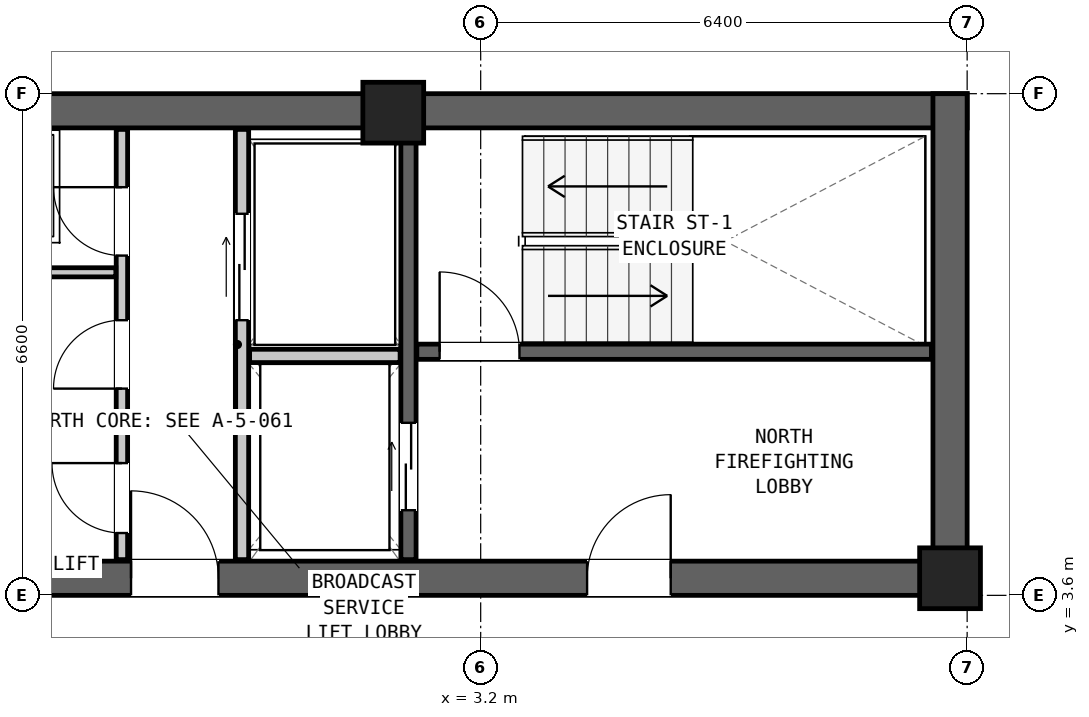
"""IFC4 building model, lengths in metres.
Left out: names, types, materials, properties, quantities, classifications, styles, units other than length and angle.
Written with IfcOpenShell. Run it as: python <this file> out.ifc"""

import sys

from ifc_helpers import new_model, si_unit, direction, frame, frame_2d, origin, origin_2d, place, context, subcontext, project, spatial, rectangle, extrude, element, fill, save


model = new_model("IFC4")
c1 = context("Model", 3, precision=1e-05, world=origin(), true_north=direction((0.0, 1.0)))
c2 = subcontext(c1, "Body", "Model", "MODEL_VIEW")
j1 = project(units=[si_unit("LENGTHUNIT", "METRE"), si_unit("PLANEANGLEUNIT", "RADIAN")], contexts=[c1])
p1 = place(None, origin())
s1 = spatial("IfcSite", under=j1, at=p1, CompositionType="ELEMENT")
p2 = place(p1, origin())
s2 = spatial("IfcBuilding", under=s1, at=p2, CompositionType="ELEMENT")
p3 = place(p2, frame((0.0, 0.0, 199.5)))
s3 = spatial("IfcBuildingStorey", under=s2, at=p3, CompositionType="ELEMENT", Elevation=199.5)
p4 = place(p3, frame((-9.6, 9.975, 0.0), z_axis=(0.0, 0.0, 1.0), x_axis=(1.0, 0.0, 0.0)))
e1 = element("IfcWall", 1, at=p4, inside=s3, PredefinedType="SHEAR", context=c2, shape_type="SweptSolid", body=[
    extrude(rectangle(XDim=19.2, YDim=0.45, at=frame_2d((9.6, 0.0))), origin(), (0.0, 0.0, 1.0), 3.05),
])
p5 = place(p3, frame((-9.6, 3.825, 0.0), z_axis=(0.0, 0.0, 1.0), x_axis=(1.0, 0.0, 0.0)))
e2 = element("IfcWall", 2, at=p5, inside=s3, PredefinedType="SHEAR", context=c2, shape_type="SweptSolid", body=[
    extrude(rectangle(XDim=19.2, YDim=0.45, at=frame_2d((9.6, 0.0))), origin(), (0.0, 0.0, 1.0), 3.05),
])
p6 = place(p5, frame((14.2, 0.0, 0.0)))
e3 = element("IfcOpeningElement", 3, at=p6, cuts=e2, PredefinedType="OPENING", context=c2, shape_type="SweptSolid", body=[
    extrude(rectangle(XDim=1.1, YDim=2.08, at=frame_2d((0.55, 1.04))), frame((0.0, 0.237, 0.0), z_axis=(0.0, -1.0, 0.0), x_axis=(1.0, 0.0, 0.0)), (0.0, 0.0, 1.0), 0.474),
])
p7 = place(p5, frame((8.2, 0.0, 0.0)))
e4 = element("IfcOpeningElement", 4, at=p7, cuts=e2, PredefinedType="OPENING", context=c2, shape_type="SweptSolid", body=[
    extrude(rectangle(XDim=1.15, YDim=2.1, at=frame_2d((0.575, 1.05))), frame((0.0, 0.237, 0.0), z_axis=(0.0, -1.0, 0.0), x_axis=(1.0, 0.0, 0.0)), (0.0, 0.0, 1.0), 0.474),
])
p8 = place(p5, frame((2.5, 0.0, 0.0)))
e5 = element("IfcOpeningElement", 5, at=p8, cuts=e2, PredefinedType="OPENING", context=c2, shape_type="SweptSolid", body=[
    extrude(rectangle(XDim=1.6, YDim=2.12, at=frame_2d((0.8, 1.06))), frame((0.0, 0.237, 0.0), z_axis=(0.0, -1.0, 0.0), x_axis=(1.0, 0.0, 0.0)), (0.0, 0.0, 1.0), 0.474),
])
p9 = place(p3, frame((9.375, 3.6, 0.0), z_axis=(0.0, 0.0, 1.0), x_axis=(0.0, 1.0, 0.0)))
e6 = element("IfcWall", 6, at=p9, inside=s3, PredefinedType="SHEAR", context=c2, shape_type="SweptSolid", body=[
    extrude(rectangle(XDim=6.6, YDim=0.45, at=frame_2d((3.3, 0.0))), origin(), (0.0, 0.0, 1.0), 3.05),
])
for number, where, z_axis, x_axis in (
    (7, (2.05, 9.95, 0.0), (0.0, 0.0, 1.0), (1.0, 0.0, 0.0)),
    (8, (9.375, 3.825, 0.0), (0.0, 0.0, 1.0), (1.0, 0.0, 0.0)),
):
    element("IfcColumn", number, at=place(p3, frame(where, z_axis=z_axis, x_axis=x_axis)), inside=s3, PredefinedType="COLUMN", context=c2, shape_type="SweptSolid", body=[
        extrude(rectangle(XDim=0.8, YDim=0.8, at=origin_2d()), origin(), (0.0, 0.0, 1.0), 3.05),
    ])
p10 = place(p3, frame((2.36, 6.805, 0.0), z_axis=(0.0, 0.0, 1.0), x_axis=(1.0, 0.0, 0.0)))
e9 = element("IfcWall", 9, at=p10, inside=s3, PredefinedType="SHEAR", context=c2, shape_type="SweptSolid", body=[
    extrude(rectangle(XDim=6.77, YDim=0.2, at=frame_2d((3.385, 0.0))), origin(), (0.0, 0.0, 1.0), 2.86),
])
p11 = place(p10, frame((0.3, 0.0, 0.0)))
e10 = element("IfcOpeningElement", 10, at=p11, cuts=e9, PredefinedType="OPENING", context=c2, shape_type="SweptSolid", body=[
    extrude(rectangle(XDim=1.05, YDim=2.08, at=frame_2d((0.525, 1.04))), frame((0.0, 0.112, 0.0), z_axis=(0.0, -1.0, 0.0), x_axis=(1.0, 0.0, 0.0)), (0.0, 0.0, 1.0), 0.224),
])
p12 = place(p3, frame((2.25, 4.07, 0.0), z_axis=(0.0, 0.0, 1.0), x_axis=(0.0, 1.0, 0.0)))
e11 = element("IfcWall", 11, at=p12, inside=s3, PredefinedType="SHEAR", context=c2, shape_type="SweptSolid", body=[
    extrude(rectangle(XDim=5.66, YDim=0.2, at=frame_2d((2.83, 0.0))), origin(), (0.0, 0.0, 1.0), 2.86),
])
p13 = place(p12, frame((0.65, 0.0, 0.0)))
e12 = element("IfcOpeningElement", 12, at=p13, cuts=e11, PredefinedType="OPENING", context=c2, shape_type="SweptSolid", body=[
    extrude(rectangle(XDim=1.15, YDim=2.08, at=frame_2d((0.575, 1.04))), frame((0.0, 0.112, 0.0), z_axis=(0.0, -1.0, 0.0), x_axis=(1.0, 0.0, 0.0)), (0.0, 0.0, 1.0), 0.224),
])
p14 = place(p3, frame((0.06, 4.07, 0.0), z_axis=(0.0, 0.0, 1.0), x_axis=(0.0, 1.0, 0.0)))
e13 = element("IfcWall", 13, at=p14, inside=s3, PredefinedType="PARTITIONING", context=c2, shape_type="SweptSolid", body=[
    extrude(rectangle(XDim=5.66, YDim=0.175, at=frame_2d((2.83, 0.0))), origin(), (0.0, 0.0, 1.0), 2.86),
])
p15 = place(p14, frame((3.15, 0.0, 0.0)))
e14 = element("IfcOpeningElement", 14, at=p15, cuts=e13, PredefinedType="OPENING", context=c2, shape_type="SweptSolid", body=[
    extrude(rectangle(XDim=1.4, YDim=2.12, at=frame_2d((0.7, 1.06))), frame((0.0, 0.1, 0.0), z_axis=(0.0, -1.0, 0.0), x_axis=(1.0, 0.0, 0.0)), (0.0, 0.0, 1.0), 0.199),
])
p16 = place(p3, frame((0.16, 6.75, 0.0), z_axis=(0.0, 0.0, 1.0), x_axis=(1.0, 0.0, 0.0)))
e15 = element("IfcWall", 15, at=p16, inside=s3, PredefinedType="PARTITIONING", context=c2, shape_type="SweptSolid", body=[
    extrude(rectangle(XDim=1.98, YDim=0.175, at=frame_2d((0.99, 0.0))), origin(), (0.0, 0.0, 1.0), 2.86),
])
p17 = place(p3, frame((-1.52, 4.07, 0.0), z_axis=(0.0, 0.0, 1.0), x_axis=(0.0, 1.0, 0.0)))
e16 = element("IfcWall", 16, at=p17, inside=s3, PredefinedType="PARTITIONING", context=c2, shape_type="SweptSolid", body=[
    extrude(rectangle(XDim=5.66, YDim=0.15, at=frame_2d((2.83, 0.0))), origin(), (0.0, 0.0, 1.0), 2.86),
])
p18 = place(p17, frame((4.0, 0.0, 0.0)))
e17 = element("IfcOpeningElement", 17, at=p18, cuts=e16, PredefinedType="OPENING", context=c2, shape_type="SweptSolid", body=[
    extrude(rectangle(XDim=0.9, YDim=2.05, at=frame_2d((0.45, 1.025))), frame((0.0, 0.087, 0.0), z_axis=(0.0, -1.0, 0.0), x_axis=(1.0, 0.0, 0.0)), (0.0, 0.0, 1.0), 0.174),
])
p19 = place(p17, frame((2.25, 0.0, 0.0)))
e18 = element("IfcOpeningElement", 18, at=p19, cuts=e16, PredefinedType="OPENING", context=c2, shape_type="SweptSolid", body=[
    extrude(rectangle(XDim=0.9, YDim=2.05, at=frame_2d((0.45, 1.025))), frame((0.0, 0.087, 0.0), z_axis=(0.0, -1.0, 0.0), x_axis=(1.0, 0.0, 0.0)), (0.0, 0.0, 1.0), 0.174),
])
p20 = place(p17, frame((0.35, 0.0, 0.0)))
e19 = element("IfcOpeningElement", 19, at=p20, cuts=e16, PredefinedType="OPENING", context=c2, shape_type="SweptSolid", body=[
    extrude(rectangle(XDim=0.92, YDim=2.1, at=frame_2d((0.46, 1.05))), frame((0.0, 0.087, 0.0), z_axis=(0.0, -1.0, 0.0), x_axis=(1.0, 0.0, 0.0)), (0.0, 0.0, 1.0), 0.174),
])
for number, where, z_axis, x_axis in (
    (20, (-2.96, 5.95, 0.0), (0.0, 0.0, 1.0), (1.0, 0.0, 0.0)),
    (21, (-2.96, 7.85, 0.0), (0.0, 0.0, 1.0), (1.0, 0.0, 0.0)),
):
    element("IfcWall", number, at=place(p3, frame(where, z_axis=z_axis, x_axis=x_axis)), inside=s3, PredefinedType="PARTITIONING", context=c2, shape_type="SweptSolid", body=[
        extrude(rectangle(XDim=1.36, YDim=0.12, at=frame_2d((0.68, 0.0))), origin(), (0.0, 0.0, 1.0), 2.86),
    ])
p21 = place(p11, origin())
e22 = element("IfcDoor", 22, at=p21, inside=s3, OperationType="SINGLE_SWING_LEFT", PredefinedType="DOOR", context=c2, shape_type="SweptSolid", body=[
    extrude(rectangle(XDim=1.05, YDim=2.08, at=frame_2d((0.525, 1.04))), frame((0.0, 0.025, 0.0), z_axis=(0.0, -1.0, 0.0), x_axis=(1.0, 0.0, 0.0)), (0.0, 0.0, 1.0), 0.05),
])
fill(e10, e22)
p22 = place(p6, origin())
e23 = element("IfcDoor", 23, at=p22, inside=s3, OperationType="SINGLE_SWING_RIGHT", PredefinedType="DOOR", context=c2, shape_type="SweptSolid", body=[
    extrude(rectangle(XDim=1.1, YDim=2.08, at=frame_2d((0.55, 1.04))), frame((0.0, 0.025, 0.0), z_axis=(0.0, -1.0, 0.0), x_axis=(1.0, 0.0, 0.0)), (0.0, 0.0, 1.0), 0.05),
])
fill(e3, e23)
p23 = place(p13, origin())
e24 = element("IfcDoor", 24, at=p23, inside=s3, OperationType="DOUBLE_DOOR_SLIDING", PredefinedType="DOOR", context=c2, shape_type="SweptSolid", body=[
    extrude(rectangle(XDim=1.15, YDim=2.08, at=frame_2d((0.575, 1.04))), frame((0.0, 0.025, 0.0), z_axis=(0.0, -1.0, 0.0), x_axis=(1.0, 0.0, 0.0)), (0.0, 0.0, 1.0), 0.05),
])
fill(e12, e24)
p24 = place(p15, origin())
e25 = element("IfcDoor", 25, at=p24, inside=s3, OperationType="DOUBLE_DOOR_SLIDING", PredefinedType="DOOR", context=c2, shape_type="SweptSolid", body=[
    extrude(rectangle(XDim=1.4, YDim=2.12, at=frame_2d((0.7, 1.06))), frame((0.0, 0.025, 0.0), z_axis=(0.0, -1.0, 0.0), x_axis=(1.0, 0.0, 0.0)), (0.0, 0.0, 1.0), 0.05),
])
fill(e14, e25)
p25 = place(p7, origin())
e26 = element("IfcDoor", 26, at=p25, inside=s3, OperationType="SINGLE_SWING_LEFT", PredefinedType="DOOR", context=c2, shape_type="SweptSolid", body=[
    extrude(rectangle(XDim=1.15, YDim=2.1, at=frame_2d((0.575, 1.05))), frame((0.0, 0.025, 0.0), z_axis=(0.0, -1.0, 0.0), x_axis=(1.0, 0.0, 0.0)), (0.0, 0.0, 1.0), 0.05),
])
fill(e4, e26)
p26 = place(p18, origin())
e27 = element("IfcDoor", 27, at=p26, inside=s3, OperationType="SINGLE_SWING_RIGHT", PredefinedType="DOOR", context=c2, shape_type="SweptSolid", body=[
    extrude(rectangle(XDim=0.9, YDim=2.05, at=frame_2d((0.45, 1.025))), frame((0.0, 0.025, 0.0), z_axis=(0.0, -1.0, 0.0), x_axis=(1.0, 0.0, 0.0)), (0.0, 0.0, 1.0), 0.05),
])
fill(e17, e27)
p27 = place(p19, origin())
e28 = element("IfcDoor", 28, at=p27, inside=s3, OperationType="SINGLE_SWING_LEFT", PredefinedType="DOOR", context=c2, shape_type="SweptSolid", body=[
    extrude(rectangle(XDim=0.9, YDim=2.05, at=frame_2d((0.45, 1.025))), frame((0.0, 0.025, 0.0), z_axis=(0.0, -1.0, 0.0), x_axis=(1.0, 0.0, 0.0)), (0.0, 0.0, 1.0), 0.05),
])
fill(e18, e28)
p28 = place(p20, origin())
e29 = element("IfcDoor", 29, at=p28, inside=s3, OperationType="SINGLE_SWING_RIGHT", PredefinedType="DOOR", context=c2, shape_type="SweptSolid", body=[
    extrude(rectangle(XDim=0.92, YDim=2.1, at=frame_2d((0.46, 1.05))), frame((0.0, 0.025, 0.0), z_axis=(0.0, -1.0, 0.0), x_axis=(1.0, 0.0, 0.0)), (0.0, 0.0, 1.0), 0.05),
])
fill(e19, e29)
save(model, sys.argv[1])
